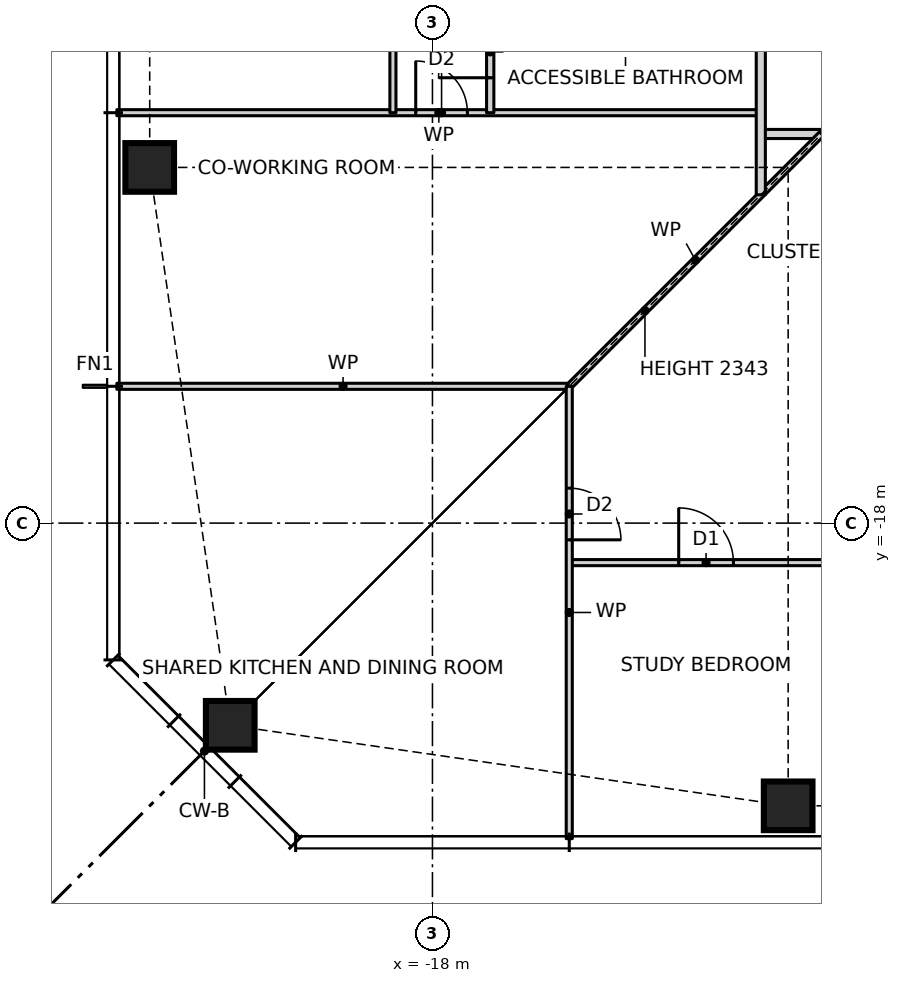
"""IFC4 building model, lengths in metres.
Left out: names, types, materials, properties, quantities, classifications, styles, units other than length and angle.
Written with IfcOpenShell. Run it as: python <this file> out.ifc"""

import sys

from ifc_helpers import new_model, si_unit, direction, frame, frame_2d, origin, origin_2d, place, context, subcontext, project, spatial, rectangle, hollow_rectangle, extrude, element, fill, save


model = new_model("IFC4")
c1 = context("Model", 3, precision=1e-05, world=origin(), true_north=direction((0.0, 1.0)))
c2 = subcontext(c1, "Body", "Model", "MODEL_VIEW")
j1 = project(units=[si_unit("LENGTHUNIT", "METRE"), si_unit("PLANEANGLEUNIT", "RADIAN")], contexts=[c1])
p1 = place(None, origin())
s1 = spatial("IfcSite", under=j1, at=p1, CompositionType="ELEMENT")
p2 = place(p1, origin())
s2 = spatial("IfcBuilding", under=s1, at=p2, CompositionType="ELEMENT")
p3 = place(p2, frame((0.0, 0.0, 53.5)))
s3 = spatial("IfcBuildingStorey", under=s2, at=p3, CompositionType="ELEMENT", Elevation=53.5)
for number, where, z_axis, x_axis in (
    (1, (-21.326, -21.326, 0.0), (0.0, 0.0, 1.0), (1.0, 0.0, 0.0)),
    (2, (-12.15, -22.65, 0.0), (0.0, 0.0, 1.0), (1.0, 0.0, 0.0)),
    (3, (-22.65, -12.15, 0.0), (0.0, 0.0, 1.0), (1.0, 0.0, 0.0)),
):
    element("IfcColumn", number, at=place(p3, frame(where, z_axis=z_axis, x_axis=x_axis)), inside=s3, PredefinedType="COLUMN", context=c2, shape_type="SweptSolid", body=[
        extrude(hollow_rectangle(XDim=0.8, YDim=0.8, WallThickness=0.09, at=origin_2d()), origin(), (0.0, 0.0, 1.0), 3.5),
    ])
p4 = place(p3, frame((-15.75, -18.65, 0.0), z_axis=(0.0, 0.0, 1.0), x_axis=(1.0, 0.0, 0.0)))
e4 = element("IfcWall", 4, at=p4, inside=s3, PredefinedType="PARTITIONING", context=c2, shape_type="SweptSolid", body=[
    extrude(rectangle(XDim=31.5, YDim=0.1, at=frame_2d((15.75, 0.0))), origin(), (0.0, 0.0, 1.0), 3.27),
])
p5 = place(p4, frame((1.8, 0.0, 0.0)))
e5 = element("IfcOpeningElement", 5, at=p5, cuts=e4, PredefinedType="OPENING", context=c2, shape_type="SweptSolid", body=[
    extrude(rectangle(XDim=0.9, YDim=2.1, at=frame_2d((0.45, 1.05))), frame((0.0, 0.06, 0.0), z_axis=(0.0, -1.0, 0.0), x_axis=(1.0, 0.0, 0.0)), (0.0, 0.0, 1.0), 0.12),
])
p6 = place(p4, frame((6.3, 0.0, 0.0)))
e6 = element("IfcOpeningElement", 6, at=p6, cuts=e4, PredefinedType="OPENING", context=c2, shape_type="SweptSolid", body=[
    extrude(rectangle(XDim=0.9, YDim=2.1, at=frame_2d((0.45, 1.05))), frame((0.0, 0.06, 0.0), z_axis=(0.0, -1.0, 0.0), x_axis=(1.0, 0.0, 0.0)), (0.0, 0.0, 1.0), 0.12),
])
p7 = place(p4, frame((10.8, 0.0, 0.0)))
e7 = element("IfcOpeningElement", 7, at=p7, cuts=e4, PredefinedType="OPENING", context=c2, shape_type="SweptSolid", body=[
    extrude(rectangle(XDim=0.9, YDim=2.1, at=frame_2d((0.45, 1.05))), frame((0.0, 0.06, 0.0), z_axis=(0.0, -1.0, 0.0), x_axis=(1.0, 0.0, 0.0)), (0.0, 0.0, 1.0), 0.12),
])
p8 = place(p4, frame((15.3, 0.0, 0.0)))
e8 = element("IfcOpeningElement", 8, at=p8, cuts=e4, PredefinedType="OPENING", context=c2, shape_type="SweptSolid", body=[
    extrude(rectangle(XDim=0.9, YDim=2.1, at=frame_2d((0.45, 1.05))), frame((0.0, 0.06, 0.0), z_axis=(0.0, -1.0, 0.0), x_axis=(1.0, 0.0, 0.0)), (0.0, 0.0, 1.0), 0.12),
])
p9 = place(p4, frame((19.8, 0.0, 0.0)))
e9 = element("IfcOpeningElement", 9, at=p9, cuts=e4, PredefinedType="OPENING", context=c2, shape_type="SweptSolid", body=[
    extrude(rectangle(XDim=0.9, YDim=2.1, at=frame_2d((0.45, 1.05))), frame((0.0, 0.06, 0.0), z_axis=(0.0, -1.0, 0.0), x_axis=(1.0, 0.0, 0.0)), (0.0, 0.0, 1.0), 0.12),
])
p10 = place(p4, frame((24.3, 0.0, 0.0)))
e10 = element("IfcOpeningElement", 10, at=p10, cuts=e4, PredefinedType="OPENING", context=c2, shape_type="SweptSolid", body=[
    extrude(rectangle(XDim=0.9, YDim=2.1, at=frame_2d((0.45, 1.05))), frame((0.0, 0.06, 0.0), z_axis=(0.0, -1.0, 0.0), x_axis=(1.0, 0.0, 0.0)), (0.0, 0.0, 1.0), 0.12),
])
p11 = place(p4, frame((28.8, 0.0, 0.0)))
e11 = element("IfcOpeningElement", 11, at=p11, cuts=e4, PredefinedType="OPENING", context=c2, shape_type="SweptSolid", body=[
    extrude(rectangle(XDim=0.9, YDim=2.1, at=frame_2d((0.45, 1.05))), frame((0.0, 0.06, 0.0), z_axis=(0.0, -1.0, 0.0), x_axis=(1.0, 0.0, 0.0)), (0.0, 0.0, 1.0), 0.12),
])
p12 = place(p3, frame((-23.19, -15.75, 0.0), z_axis=(0.0, 0.0, 1.0), x_axis=(1.0, 0.0, 0.0)))
e12 = element("IfcWall", 12, at=p12, inside=s3, PredefinedType="PARTITIONING", context=c2, shape_type="SweptSolid", body=[
    extrude(rectangle(XDim=7.44, YDim=0.1, at=frame_2d((3.72, 0.0))), origin(), (0.0, 0.0, 1.0), 3.27),
])
p13 = place(p3, frame((-12.6, -11.6, 0.0), z_axis=(0.0, 0.0, 1.0), x_axis=(1.0, 0.0, 0.0)))
e13 = element("IfcWall", 13, at=p13, inside=s3, PredefinedType="PARTITIONING", context=c2, shape_type="SweptSolid", body=[
    extrude(rectangle(XDim=24.2, YDim=0.15, at=frame_2d((12.1, 0.0))), origin(), (0.0, 0.0, 1.0), 3.27),
])
p14 = place(p13, frame((1.74, 0.0, 0.0)))
e14 = element("IfcOpeningElement", 14, at=p14, cuts=e13, PredefinedType="OPENING", context=c2, shape_type="SweptSolid", body=[
    extrude(rectangle(XDim=1.0, YDim=2.1, at=frame_2d((0.5, 1.05))), frame((0.0, 0.085, 0.0), z_axis=(0.0, -1.0, 0.0), x_axis=(1.0, 0.0, 0.0)), (0.0, 0.0, 1.0), 0.17),
])
p15 = place(p13, frame((22.025, 0.0, 0.0)))
e15 = element("IfcOpeningElement", 15, at=p15, cuts=e13, PredefinedType="OPENING", context=c2, shape_type="SweptSolid", body=[
    extrude(rectangle(XDim=1.0, YDim=2.1, at=frame_2d((0.5, 1.05))), frame((0.0, 0.085, 0.0), z_axis=(0.0, -1.0, 0.0), x_axis=(1.0, 0.0, 0.0)), (0.0, 0.0, 1.0), 0.17),
])
p16 = place(p3, frame((-23.19, -11.25, 0.0), z_axis=(0.0, 0.0, 1.0), x_axis=(1.0, 0.0, 0.0)))
e16 = element("IfcWall", 16, at=p16, inside=s3, PredefinedType="PARTITIONING", context=c2, shape_type="SweptSolid", body=[
    extrude(rectangle(XDim=10.59, YDim=0.1, at=frame_2d((5.295, 0.0))), origin(), (0.0, 0.0, 1.0), 3.27),
])
p17 = place(p16, frame((4.915, 0.0, 0.0)))
e17 = element("IfcOpeningElement", 17, at=p17, cuts=e16, PredefinedType="OPENING", context=c2, shape_type="SweptSolid", body=[
    extrude(rectangle(XDim=0.85, YDim=2.1, at=frame_2d((0.425, 1.05))), frame((0.0, 0.06, 0.0), z_axis=(0.0, -1.0, 0.0), x_axis=(1.0, 0.0, 0.0)), (0.0, 0.0, 1.0), 0.12),
])
p18 = place(p3, frame((-15.75, -15.75, 0.0), z_axis=(0.0, 0.0, 1.0), x_axis=(0.707106781187, 0.707106781187, 0.0)))
e18 = element("IfcWall", 18, at=p18, inside=s3, PredefinedType="PARTITIONING", context=c2, shape_type="SweptSolid", body=[
    extrude(rectangle(XDim=5.869, YDim=0.1, at=frame_2d((2.935, 0.0))), origin(), (0.0, 0.0, 1.0), 2.343),
])
p19 = place(p3, frame((-12.6, -12.6, 0.0), z_axis=(0.0, 0.0, 1.0), x_axis=(0.0, 1.0, 0.0)))
e19 = element("IfcWall", 19, at=p19, inside=s3, PredefinedType="PARTITIONING", context=c2, shape_type="SweptSolid", body=[
    extrude(rectangle(XDim=25.2, YDim=0.15, at=frame_2d((12.6, 0.0))), origin(), (0.0, 0.0, 1.0), 3.27),
])
p20 = place(p19, frame((7.15, 0.0, 0.0)))
e20 = element("IfcOpeningElement", 20, at=p20, cuts=e19, PredefinedType="OPENING", context=c2, shape_type="SweptSolid", body=[
    extrude(rectangle(XDim=1.0, YDim=2.1, at=frame_2d((0.5, 1.05))), frame((0.0, 0.085, 0.0), z_axis=(0.0, -1.0, 0.0), x_axis=(1.0, 0.0, 0.0)), (0.0, 0.0, 1.0), 0.17),
])
p21 = place(p3, frame((-15.75, -23.19, 0.0), z_axis=(0.0, 0.0, 1.0), x_axis=(0.0, 1.0, 0.0)))
e21 = element("IfcWall", 21, at=p21, inside=s3, PredefinedType="PARTITIONING", context=c2, shape_type="SweptSolid", body=[
    extrude(rectangle(XDim=7.44, YDim=0.1, at=frame_2d((3.72, 0.0))), origin(), (0.0, 0.0, 1.0), 3.27),
])
p22 = place(p21, frame((4.915, 0.0, 0.0)))
e22 = element("IfcOpeningElement", 22, at=p22, cuts=e21, PredefinedType="OPENING", context=c2, shape_type="SweptSolid", body=[
    extrude(rectangle(XDim=0.85, YDim=2.1, at=frame_2d((0.425, 1.05))), frame((0.0, 0.06, 0.0), z_axis=(0.0, -1.0, 0.0), x_axis=(1.0, 0.0, 0.0)), (0.0, 0.0, 1.0), 0.12),
])
p23 = place(p3, frame((-17.05, -11.25, 0.0), z_axis=(0.0, 0.0, 1.0), x_axis=(0.0, 1.0, 0.0)))
e23 = element("IfcWall", 23, at=p23, inside=s3, PredefinedType="PARTITIONING", context=c2, shape_type="SweptSolid", body=[
    extrude(rectangle(XDim=5.1, YDim=0.12, at=frame_2d((2.55, 0.0))), origin(), (0.0, 0.0, 1.0), 3.27),
])
p24 = place(p23, frame((2.375, 0.0, 0.0)))
e24 = element("IfcOpeningElement", 24, at=p24, cuts=e23, PredefinedType="OPENING", context=c2, shape_type="SweptSolid", body=[
    extrude(rectangle(XDim=0.85, YDim=2.1, at=frame_2d((0.425, 1.05))), frame((0.0, 0.07, 0.0), z_axis=(0.0, -1.0, 0.0), x_axis=(1.0, 0.0, 0.0)), (0.0, 0.0, 1.0), 0.14),
])
p25 = place(p23, frame((0.575, 0.0, 0.0)))
e25 = element("IfcOpeningElement", 25, at=p25, cuts=e23, PredefinedType="OPENING", context=c2, shape_type="SweptSolid", body=[
    extrude(rectangle(XDim=0.85, YDim=2.1, at=frame_2d((0.425, 1.05))), frame((0.0, 0.07, 0.0), z_axis=(0.0, -1.0, 0.0), x_axis=(1.0, 0.0, 0.0)), (0.0, 0.0, 1.0), 0.14),
])
p26 = place(p3, frame((-18.65, -11.25, 0.0), z_axis=(0.0, 0.0, 1.0), x_axis=(0.0, 1.0, 0.0)))
e26 = element("IfcWall", 26, at=p26, inside=s3, PredefinedType="PARTITIONING", context=c2, shape_type="SweptSolid", body=[
    extrude(rectangle(XDim=27.0, YDim=0.1, at=frame_2d((13.5, 0.0))), origin(), (0.0, 0.0, 1.0), 3.27),
])
p27 = place(p26, frame((24.3, 0.0, 0.0)))
e27 = element("IfcOpeningElement", 27, at=p27, cuts=e26, PredefinedType="OPENING", context=c2, shape_type="SweptSolid", body=[
    extrude(rectangle(XDim=0.9, YDim=2.1, at=frame_2d((0.45, 1.05))), frame((0.0, 0.06, 0.0), z_axis=(0.0, -1.0, 0.0), x_axis=(1.0, 0.0, 0.0)), (0.0, 0.0, 1.0), 0.12),
])
p28 = place(p26, frame((19.8, 0.0, 0.0)))
e28 = element("IfcOpeningElement", 28, at=p28, cuts=e26, PredefinedType="OPENING", context=c2, shape_type="SweptSolid", body=[
    extrude(rectangle(XDim=0.9, YDim=2.1, at=frame_2d((0.45, 1.05))), frame((0.0, 0.06, 0.0), z_axis=(0.0, -1.0, 0.0), x_axis=(1.0, 0.0, 0.0)), (0.0, 0.0, 1.0), 0.12),
])
p29 = place(p26, frame((15.3, 0.0, 0.0)))
e29 = element("IfcOpeningElement", 29, at=p29, cuts=e26, PredefinedType="OPENING", context=c2, shape_type="SweptSolid", body=[
    extrude(rectangle(XDim=0.9, YDim=2.1, at=frame_2d((0.45, 1.05))), frame((0.0, 0.06, 0.0), z_axis=(0.0, -1.0, 0.0), x_axis=(1.0, 0.0, 0.0)), (0.0, 0.0, 1.0), 0.12),
])
p30 = place(p26, frame((10.8, 0.0, 0.0)))
e30 = element("IfcOpeningElement", 30, at=p30, cuts=e26, PredefinedType="OPENING", context=c2, shape_type="SweptSolid", body=[
    extrude(rectangle(XDim=0.9, YDim=2.1, at=frame_2d((0.45, 1.05))), frame((0.0, 0.06, 0.0), z_axis=(0.0, -1.0, 0.0), x_axis=(1.0, 0.0, 0.0)), (0.0, 0.0, 1.0), 0.12),
])
p31 = place(p26, frame((6.3, 0.0, 0.0)))
e31 = element("IfcOpeningElement", 31, at=p31, cuts=e26, PredefinedType="OPENING", context=c2, shape_type="SweptSolid", body=[
    extrude(rectangle(XDim=0.9, YDim=2.1, at=frame_2d((0.45, 1.05))), frame((0.0, 0.06, 0.0), z_axis=(0.0, -1.0, 0.0), x_axis=(1.0, 0.0, 0.0)), (0.0, 0.0, 1.0), 0.12),
])
p32 = place(p26, frame((1.8, 0.0, 0.0)))
e32 = element("IfcOpeningElement", 32, at=p32, cuts=e26, PredefinedType="OPENING", context=c2, shape_type="SweptSolid", body=[
    extrude(rectangle(XDim=0.9, YDim=2.1, at=frame_2d((0.45, 1.05))), frame((0.0, 0.06, 0.0), z_axis=(0.0, -1.0, 0.0), x_axis=(1.0, 0.0, 0.0)), (0.0, 0.0, 1.0), 0.12),
])
p33 = place(p5, origin())
e33 = element("IfcDoor", 33, at=p33, inside=s3, OperationType="SINGLE_SWING_LEFT", PredefinedType="DOOR", context=c2, shape_type="SweptSolid", body=[
    extrude(rectangle(XDim=0.9, YDim=2.1, at=frame_2d((0.45, 1.05))), frame((0.0, 0.025, 0.0), z_axis=(0.0, -1.0, 0.0), x_axis=(1.0, 0.0, 0.0)), (0.0, 0.0, 1.0), 0.05),
])
fill(e5, e33)
p34 = place(p25, origin())
e34 = element("IfcDoor", 34, at=p34, inside=s3, OperationType="SINGLE_SWING_LEFT", PredefinedType="DOOR", context=c2, shape_type="SweptSolid", body=[
    extrude(rectangle(XDim=0.85, YDim=2.1, at=frame_2d((0.425, 1.05))), frame((0.0, 0.025, 0.0), z_axis=(0.0, -1.0, 0.0), x_axis=(1.0, 0.0, 0.0)), (0.0, 0.0, 1.0), 0.05),
])
fill(e25, e34)
p35 = place(p17, origin())
e35 = element("IfcDoor", 35, at=p35, inside=s3, OperationType="SINGLE_SWING_LEFT", PredefinedType="DOOR", context=c2, shape_type="SweptSolid", body=[
    extrude(rectangle(XDim=0.85, YDim=2.1, at=frame_2d((0.425, 1.05))), frame((0.0, 0.025, 0.0), z_axis=(0.0, -1.0, 0.0), x_axis=(1.0, 0.0, 0.0)), (0.0, 0.0, 1.0), 0.05),
])
fill(e17, e35)
p36 = place(p22, frame((0.85, 0.0, 0.0), z_axis=(0.0, 0.0, 1.0), x_axis=(-1.0, 0.0, 0.0)))
e36 = element("IfcDoor", 36, at=p36, inside=s3, OperationType="SINGLE_SWING_RIGHT", PredefinedType="DOOR", context=c2, shape_type="SweptSolid", body=[
    extrude(rectangle(XDim=0.85, YDim=2.1, at=frame_2d((0.425, 1.05))), frame((0.0, 0.025, 0.0), z_axis=(0.0, -1.0, 0.0), x_axis=(1.0, 0.0, 0.0)), (0.0, 0.0, 1.0), 0.05),
])
fill(e22, e36)
save(model, sys.argv[1])
